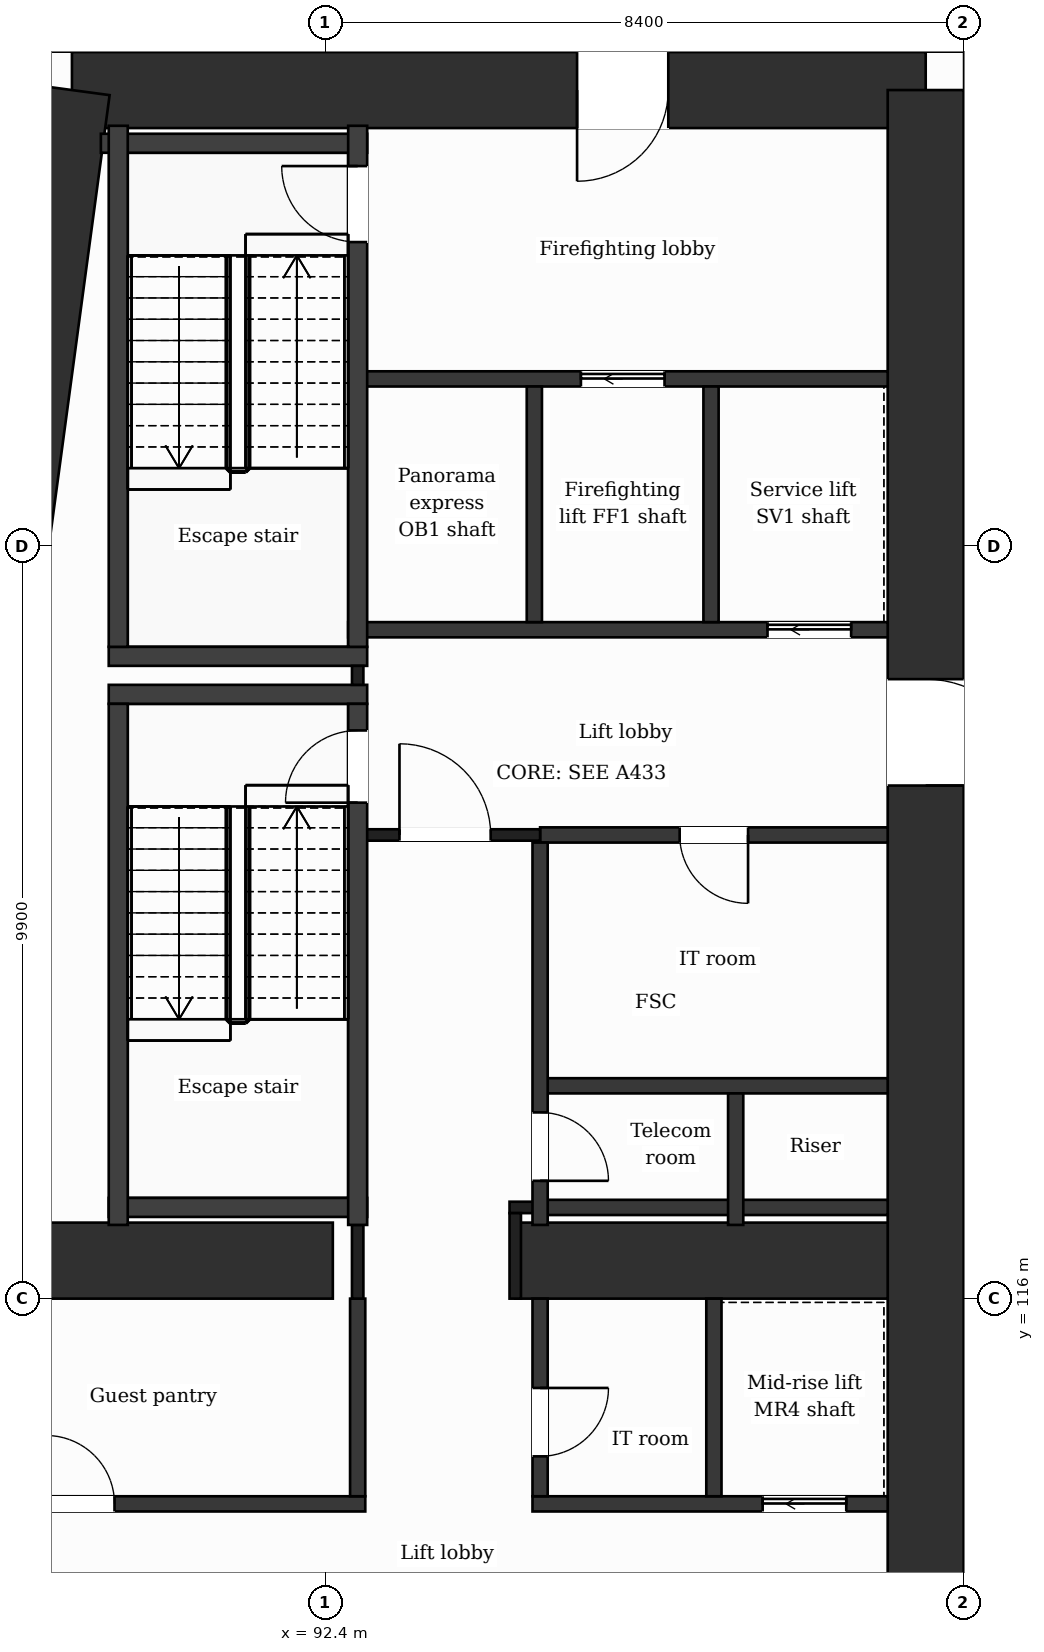
"""IFC4 building model, lengths in metres.
Left out: names, types, materials, properties, quantities, classifications, styles, units other than length and angle.
Written with IfcOpenShell. Run it as: python <this file> out.ifc"""

import sys

from ifc_helpers import new_model, si_unit, direction, frame, frame_2d, origin, place, context, subcontext, project, spatial, rectangle, extrude, element, fill, save


model = new_model("IFC4")
c1 = context("Model", 3, precision=1e-05, world=origin(), true_north=direction((0.0, 1.0)))
c2 = subcontext(c1, "Body", "Model", "MODEL_VIEW")
j1 = project(units=[si_unit("LENGTHUNIT", "METRE"), si_unit("PLANEANGLEUNIT", "RADIAN")], contexts=[c1])
p1 = place(None, origin())
s1 = spatial("IfcSite", under=j1, at=p1, CompositionType="ELEMENT")
p2 = place(p1, origin())
s2 = spatial("IfcBuilding", under=s1, at=p2, CompositionType="ELEMENT")
p3 = place(p2, frame((0.0, 0.0, 135.4)))
s3 = spatial("IfcBuildingStorey", under=s2, at=p3, CompositionType="ELEMENT", Elevation=135.4)
p4 = place(p3, frame((89.068, 131.9, 0.0), z_axis=(0.0, 0.0, 1.0), x_axis=(1.0, 0.0, 0.0)))
e1 = element("IfcWall", 1, at=p4, inside=s3, PredefinedType="SHEAR", context=c2, shape_type="SweptSolid", body=[
    extrude(rectangle(XDim=11.232, YDim=1.0, at=frame_2d((5.616, 0.0))), origin(), (0.0, 0.0, 1.0), 7.4),
])
p5 = place(p4, frame((6.646, 0.0, 0.0)))
e2 = element("IfcOpeningElement", 2, at=p5, cuts=e1, PredefinedType="OPENING", context=c2, shape_type="SweptSolid", body=[
    extrude(rectangle(XDim=1.2, YDim=2.1, at=frame_2d((0.6, 1.05))), frame((0.0, 0.51, 0.0), z_axis=(0.0, -1.0, 0.0), x_axis=(1.0, 0.0, 0.0)), (0.0, 0.0, 1.0), 1.02),
])
p6 = place(p3, frame((100.3, 131.9, 0.0), z_axis=(0.0, 0.0, 1.0), x_axis=(0.0, -1.0, 0.0)))
e3 = element("IfcWall", 3, at=p6, inside=s3, PredefinedType="SHEAR", context=c2, shape_type="SweptSolid", body=[
    extrude(rectangle(XDim=21.0, YDim=1.0, at=frame_2d((10.5, 0.0))), origin(), (0.0, 0.0, 1.0), 7.4),
])
p7 = place(p6, frame((7.75, 0.0, 0.0)))
e4 = element("IfcOpeningElement", 4, at=p7, cuts=e3, PredefinedType="OPENING", context=c2, shape_type="SweptSolid", body=[
    extrude(rectangle(XDim=1.4, YDim=2.1, at=frame_2d((0.7, 1.05))), frame((0.0, 0.51, 0.0), z_axis=(0.0, -1.0, 0.0), x_axis=(1.0, 0.0, 0.0)), (0.0, 0.0, 1.0), 1.02),
])
p8 = place(p3, frame((86.241, 110.9, 0.0), z_axis=(0.0, 0.0, 1.0), x_axis=(0.133411141623, 0.991060778808, 0.0)))
e5 = element("IfcWall", 5, at=p8, inside=s3, PredefinedType="SHEAR", context=c2, shape_type="SweptSolid", body=[
    extrude(rectangle(XDim=21.189, YDim=1.0, at=frame_2d((10.595, 0.0))), origin(), (0.0, 0.0, 1.0), 7.4),
])
p9 = place(p3, frame((87.423, 116.5, 0.0), z_axis=(0.0, 0.0, 1.0), x_axis=(1.0, 0.0, 0.0)))
e6 = element("IfcWall", 6, at=p9, inside=s3, PredefinedType="SHEAR", context=c2, shape_type="SweptSolid", body=[
    extrude(rectangle(XDim=5.077, YDim=1.0, at=frame_2d((2.539, 0.0))), origin(), (0.0, 0.0, 1.0), 7.4),
])
p10 = place(p3, frame((94.9, 116.5, 0.0), z_axis=(0.0, 0.0, 1.0), x_axis=(1.0, 0.0, 0.0)))
e7 = element("IfcWall", 7, at=p10, inside=s3, PredefinedType="SHEAR", context=c2, shape_type="SweptSolid", body=[
    extrude(rectangle(XDim=4.9, YDim=1.0, at=frame_2d((2.45, 0.0))), origin(), (0.0, 0.0, 1.0), 7.4),
])
p11 = place(p3, frame((87.039, 113.3, 0.0), z_axis=(0.0, 0.0, 1.0), x_axis=(1.0, 0.0, 0.0)))
e8 = element("IfcWall", 8, at=p11, inside=s3, PredefinedType="PARTITIONING", context=c2, shape_type="SweptSolid", body=[
    extrude(rectangle(XDim=5.888, YDim=0.2, at=frame_2d((2.944, 0.0))), origin(), (0.0, 0.0, 1.0), 6.9),
])
p12 = place(p11, frame((1.689, 0.0, 0.0)))
e9 = element("IfcOpeningElement", 9, at=p12, cuts=e8, PredefinedType="OPENING", context=c2, shape_type="SweptSolid", body=[
    extrude(rectangle(XDim=0.9, YDim=2.1, at=frame_2d((0.45, 1.05))), frame((0.0, 0.11, 0.0), z_axis=(0.0, -1.0, 0.0), x_axis=(1.0, 0.0, 0.0)), (0.0, 0.0, 1.0), 0.22),
])
p13 = place(p3, frame((95.127, 113.3, 0.0), z_axis=(0.0, 0.0, 1.0), x_axis=(1.0, 0.0, 0.0)))
e10 = element("IfcWall", 10, at=p13, inside=s3, PredefinedType="PARTITIONING", context=c2, shape_type="SweptSolid", body=[
    extrude(rectangle(XDim=4.673, YDim=0.2, at=frame_2d((2.336, 0.0))), origin(), (0.0, 0.0, 1.0), 6.9),
])
p14 = place(p13, frame((3.028, 0.0, 0.0)))
e11 = element("IfcOpeningElement", 11, at=p14, cuts=e10, PredefinedType="OPENING", context=c2, shape_type="SweptSolid", body=[
    extrude(rectangle(XDim=1.1, YDim=2.1, at=frame_2d((0.55, 1.05))), frame((0.0, 0.11, 0.0), z_axis=(0.0, -1.0, 0.0), x_axis=(1.0, 0.0, 0.0)), (0.0, 0.0, 1.0), 0.22),
])
p15 = place(p3, frame((95.227, 117.2, 0.0), z_axis=(0.0, 0.0, 1.0), x_axis=(1.0, 0.0, 0.0)))
e12 = element("IfcWall", 12, at=p15, inside=s3, PredefinedType="PARTITIONING", context=c2, shape_type="SweptSolid", body=[
    extrude(rectangle(XDim=4.573, YDim=0.2, at=frame_2d((2.287, 0.0))), origin(), (0.0, 0.0, 1.0), 6.9),
])
p16 = place(p3, frame((94.825, 117.2, 0.0), z_axis=(0.0, 0.0, 1.0), x_axis=(1.0, 0.0, 0.0)))
e13 = element("IfcWall", 13, at=p16, inside=s3, PredefinedType="PARTITIONING", context=c2, shape_type="SweptSolid", body=[
    extrude(rectangle(XDim=0.402, YDim=0.15, at=frame_2d((0.201, 0.0))), origin(), (0.0, 0.0, 1.0), 6.9),
])
p17 = place(p3, frame((89.552, 117.2, 0.0), z_axis=(0.0, 0.0, 1.0), x_axis=(1.0, 0.0, 0.0)))
e14 = element("IfcWall", 14, at=p17, inside=s3, PredefinedType="PARTITIONING", context=c2, shape_type="SweptSolid", body=[
    extrude(rectangle(XDim=3.4, YDim=0.25, at=frame_2d((1.7, 0.0))), origin(), (0.0, 0.0, 1.0), 6.9),
])
p18 = place(p3, frame((95.227, 118.8, 0.0), z_axis=(0.0, 0.0, 1.0), x_axis=(1.0, 0.0, 0.0)))
e15 = element("IfcWall", 15, at=p18, inside=s3, PredefinedType="PARTITIONING", context=c2, shape_type="SweptSolid", body=[
    extrude(rectangle(XDim=4.573, YDim=0.2, at=frame_2d((2.287, 0.0))), origin(), (0.0, 0.0, 1.0), 6.9),
])
p19 = place(p3, frame((95.227, 122.1, 0.0), z_axis=(0.0, 0.0, 1.0), x_axis=(1.0, 0.0, 0.0)))
e16 = element("IfcWall", 16, at=p19, inside=s3, PredefinedType="PARTITIONING", context=c2, shape_type="SweptSolid", body=[
    extrude(rectangle(XDim=4.573, YDim=0.2, at=frame_2d((2.287, 0.0))), origin(), (0.0, 0.0, 1.0), 6.9),
])
p20 = place(p19, frame((1.836, 0.0, 0.0)))
e17 = element("IfcOpeningElement", 17, at=p20, cuts=e16, PredefinedType="OPENING", context=c2, shape_type="SweptSolid", body=[
    extrude(rectangle(XDim=0.9, YDim=2.1, at=frame_2d((0.45, 1.05))), frame((0.0, 0.11, 0.0), z_axis=(0.0, -1.0, 0.0), x_axis=(1.0, 0.0, 0.0)), (0.0, 0.0, 1.0), 0.22),
])
p21 = place(p3, frame((92.827, 122.1, 0.0), z_axis=(0.0, 0.0, 1.0), x_axis=(1.0, 0.0, 0.0)))
e18 = element("IfcWall", 18, at=p21, inside=s3, PredefinedType="PARTITIONING", context=c2, shape_type="SweptSolid", body=[
    extrude(rectangle(XDim=2.4, YDim=0.15, at=frame_2d((1.2, 0.0))), origin(), (0.0, 0.0, 1.0), 6.9),
])
p22 = place(p21, frame((0.55, 0.0, 0.0)))
e19 = element("IfcOpeningElement", 19, at=p22, cuts=e18, PredefinedType="OPENING", context=c2, shape_type="SweptSolid", body=[
    extrude(rectangle(XDim=1.2, YDim=2.1, at=frame_2d((0.6, 1.05))), frame((0.0, 0.085, 0.0), z_axis=(0.0, -1.0, 0.0), x_axis=(1.0, 0.0, 0.0)), (0.0, 0.0, 1.0), 0.17),
])
for number, where, z_axis, x_axis in (
    (20, (89.552, 123.95, 0.0), (0.0, 0.0, 1.0), (1.0, 0.0, 0.0)),
    (21, (89.552, 124.45, 0.0), (0.0, 0.0, 1.0), (1.0, 0.0, 0.0)),
):
    element("IfcWall", number, at=place(p3, frame(where, z_axis=z_axis, x_axis=x_axis)), inside=s3, PredefinedType="PARTITIONING", context=c2, shape_type="SweptSolid", body=[
        extrude(rectangle(XDim=3.4, YDim=0.25, at=frame_2d((1.7, 0.0))), origin(), (0.0, 0.0, 1.0), 6.9),
    ])
p23 = place(p3, frame((92.702, 124.8, 0.0), z_axis=(0.0, 0.0, 1.0), x_axis=(1.0, 0.0, 0.0)))
e22 = element("IfcWall", 22, at=p23, inside=s3, PredefinedType="PARTITIONING", context=c2, shape_type="SweptSolid", body=[
    extrude(rectangle(XDim=7.098, YDim=0.2, at=frame_2d((3.549, 0.0))), origin(), (0.0, 0.0, 1.0), 6.9),
])
p24 = place(p23, frame((5.517, 0.0, 0.0)))
e23 = element("IfcOpeningElement", 23, at=p24, cuts=e22, PredefinedType="OPENING", context=c2, shape_type="SweptSolid", body=[
    extrude(rectangle(XDim=1.1, YDim=2.1, at=frame_2d((0.55, 1.05))), frame((0.0, 0.11, 0.0), z_axis=(0.0, -1.0, 0.0), x_axis=(1.0, 0.0, 0.0)), (0.0, 0.0, 1.0), 0.22),
])
p25 = place(p3, frame((92.827, 128.1, 0.0), z_axis=(0.0, 0.0, 1.0), x_axis=(1.0, 0.0, 0.0)))
e24 = element("IfcWall", 24, at=p25, inside=s3, PredefinedType="PARTITIONING", context=c2, shape_type="SweptSolid", body=[
    extrude(rectangle(XDim=6.973, YDim=0.2, at=frame_2d((3.487, 0.0))), origin(), (0.0, 0.0, 1.0), 6.9),
])
p26 = place(p25, frame((2.937, 0.0, 0.0)))
e25 = element("IfcOpeningElement", 25, at=p26, cuts=e24, PredefinedType="OPENING", context=c2, shape_type="SweptSolid", body=[
    extrude(rectangle(XDim=1.1, YDim=2.1, at=frame_2d((0.55, 1.05))), frame((0.0, 0.11, 0.0), z_axis=(0.0, -1.0, 0.0), x_axis=(1.0, 0.0, 0.0)), (0.0, 0.0, 1.0), 0.22),
])
p27 = place(p3, frame((89.448, 131.2, 0.0), z_axis=(0.0, 0.0, 1.0), x_axis=(1.0, 0.0, 0.0)))
e26 = element("IfcWall", 26, at=p27, inside=s3, PredefinedType="PARTITIONING", context=c2, shape_type="SweptSolid", body=[
    extrude(rectangle(XDim=3.504, YDim=0.25, at=frame_2d((1.752, 0.0))), origin(), (0.0, 0.0, 1.0), 6.9),
])
for number, where, z_axis, x_axis in (
    (27, (89.677, 116.97, 0.0), (0.0, 0.0, 1.0), (0.0, 1.0, 0.0)),
    (28, (89.677, 124.575, 0.0), (0.0, 0.0, 1.0), (0.0, 1.0, 0.0)),
):
    element("IfcWall", number, at=place(p3, frame(where, z_axis=z_axis, x_axis=x_axis)), inside=s3, PredefinedType="PARTITIONING", context=c2, shape_type="SweptSolid", body=[
        extrude(rectangle(XDim=6.855, YDim=0.25, at=frame_2d((3.427, 0.0))), origin(), (0.0, 0.0, 1.0), 6.9),
    ])
p28 = place(p3, frame((92.827, 113.4, 0.0), z_axis=(0.0, 0.0, 1.0), x_axis=(0.0, 1.0, 0.0)))
e29 = element("IfcWall", 29, at=p28, inside=s3, PredefinedType="PARTITIONING", context=c2, shape_type="SweptSolid", body=[
    extrude(rectangle(XDim=2.6, YDim=0.2, at=frame_2d((1.3, 0.0))), origin(), (0.0, 0.0, 1.0), 6.9),
])
p29 = place(p3, frame((92.827, 116.0, 0.0), z_axis=(0.0, 0.0, 1.0), x_axis=(0.0, 1.0, 0.0)))
e30 = element("IfcWall", 30, at=p29, inside=s3, PredefinedType="PARTITIONING", context=c2, shape_type="SweptSolid", body=[
    extrude(rectangle(XDim=0.97, YDim=0.15, at=frame_2d((0.485, 0.0))), origin(), (0.0, 0.0, 1.0), 6.9),
])
p30 = place(p3, frame((92.827, 124.075, 0.0), z_axis=(0.0, 0.0, 1.0), x_axis=(0.0, 1.0, 0.0)))
e31 = element("IfcWall", 31, at=p30, inside=s3, PredefinedType="PARTITIONING", context=c2, shape_type="SweptSolid", body=[
    extrude(rectangle(XDim=0.25, YDim=0.15, at=frame_2d((0.125, 0.0))), origin(), (0.0, 0.0, 1.0), 6.9),
])
p31 = place(p3, frame((92.827, 116.97, 0.0), z_axis=(0.0, 0.0, 1.0), x_axis=(0.0, 1.0, 0.0)))
e32 = element("IfcWall", 32, at=p31, inside=s3, PredefinedType="PARTITIONING", context=c2, shape_type="SweptSolid", body=[
    extrude(rectangle(XDim=6.855, YDim=0.25, at=frame_2d((3.427, 0.0))), origin(), (0.0, 0.0, 1.0), 6.9),
])
p32 = place(p31, frame((5.555, 0.0, 0.0)))
e33 = element("IfcOpeningElement", 33, at=p32, cuts=e32, PredefinedType="OPENING", context=c2, shape_type="SweptSolid", body=[
    extrude(rectangle(XDim=0.95, YDim=2.1, at=frame_2d((0.475, 1.05))), frame((0.0, 0.135, 0.0), z_axis=(0.0, -1.0, 0.0), x_axis=(1.0, 0.0, 0.0)), (0.0, 0.0, 1.0), 0.27),
])
p33 = place(p3, frame((92.827, 124.575, 0.0), z_axis=(0.0, 0.0, 1.0), x_axis=(0.0, 1.0, 0.0)))
e34 = element("IfcWall", 34, at=p33, inside=s3, PredefinedType="PARTITIONING", context=c2, shape_type="SweptSolid", body=[
    extrude(rectangle(XDim=6.855, YDim=0.25, at=frame_2d((3.427, 0.0))), origin(), (0.0, 0.0, 1.0), 6.9),
])
p34 = place(p33, frame((5.325, 0.0, 0.0)))
e35 = element("IfcOpeningElement", 35, at=p34, cuts=e34, PredefinedType="OPENING", context=c2, shape_type="SweptSolid", body=[
    extrude(rectangle(XDim=1.0, YDim=2.1, at=frame_2d((0.5, 1.05))), frame((0.0, 0.135, 0.0), z_axis=(0.0, -1.0, 0.0), x_axis=(1.0, 0.0, 0.0)), (0.0, 0.0, 1.0), 0.27),
])
p35 = place(p3, frame((94.9, 116.0, 0.0), z_axis=(0.0, 0.0, 1.0), x_axis=(0.0, 1.0, 0.0)))
e36 = element("IfcWall", 36, at=p35, inside=s3, PredefinedType="PARTITIONING", context=c2, shape_type="SweptSolid", body=[
    extrude(rectangle(XDim=1.125, YDim=0.15, at=frame_2d((0.562, 0.0))), origin(), (0.0, 0.0, 1.0), 6.9),
])
p36 = place(p3, frame((95.151, 124.9, 0.0), z_axis=(0.0, 0.0, 1.0), x_axis=(0.0, 1.0, 0.0)))
e37 = element("IfcWall", 37, at=p36, inside=s3, PredefinedType="PARTITIONING", context=c2, shape_type="SweptSolid", body=[
    extrude(rectangle(XDim=3.1, YDim=0.2, at=frame_2d((1.55, 0.0))), origin(), (0.0, 0.0, 1.0), 6.9),
])
p37 = place(p3, frame((95.227, 113.4, 0.0), z_axis=(0.0, 0.0, 1.0), x_axis=(0.0, 1.0, 0.0)))
e38 = element("IfcWall", 38, at=p37, inside=s3, PredefinedType="PARTITIONING", context=c2, shape_type="SweptSolid", body=[
    extrude(rectangle(XDim=2.6, YDim=0.2, at=frame_2d((1.3, 0.0))), origin(), (0.0, 0.0, 1.0), 6.9),
])
p38 = place(p37, frame((0.525, 0.0, 0.0)))
e39 = element("IfcOpeningElement", 39, at=p38, cuts=e38, PredefinedType="OPENING", context=c2, shape_type="SweptSolid", body=[
    extrude(rectangle(XDim=0.9, YDim=2.1, at=frame_2d((0.45, 1.05))), frame((0.0, 0.11, 0.0), z_axis=(0.0, -1.0, 0.0), x_axis=(1.0, 0.0, 0.0)), (0.0, 0.0, 1.0), 0.22),
])
p39 = place(p3, frame((95.227, 116.97, 0.0), z_axis=(0.0, 0.0, 1.0), x_axis=(0.0, 1.0, 0.0)))
e40 = element("IfcWall", 40, at=p39, inside=s3, PredefinedType="PARTITIONING", context=c2, shape_type="SweptSolid", body=[
    extrude(rectangle(XDim=5.03, YDim=0.2, at=frame_2d((2.515, 0.0))), origin(), (0.0, 0.0, 1.0), 6.9),
])
p40 = place(p39, frame((0.58, 0.0, 0.0)))
e41 = element("IfcOpeningElement", 41, at=p40, cuts=e40, PredefinedType="OPENING", context=c2, shape_type="SweptSolid", body=[
    extrude(rectangle(XDim=0.9, YDim=2.1, at=frame_2d((0.45, 1.05))), frame((0.0, 0.11, 0.0), z_axis=(0.0, -1.0, 0.0), x_axis=(1.0, 0.0, 0.0)), (0.0, 0.0, 1.0), 0.22),
])
p41 = place(p3, frame((97.476, 124.9, 0.0), z_axis=(0.0, 0.0, 1.0), x_axis=(0.0, 1.0, 0.0)))
e42 = element("IfcWall", 42, at=p41, inside=s3, PredefinedType="PARTITIONING", context=c2, shape_type="SweptSolid", body=[
    extrude(rectangle(XDim=3.1, YDim=0.2, at=frame_2d((1.55, 0.0))), origin(), (0.0, 0.0, 1.0), 6.9),
])
p42 = place(p3, frame((97.513, 113.4, 0.0), z_axis=(0.0, 0.0, 1.0), x_axis=(0.0, 1.0, 0.0)))
e43 = element("IfcWall", 43, at=p42, inside=s3, PredefinedType="PARTITIONING", context=c2, shape_type="SweptSolid", body=[
    extrude(rectangle(XDim=2.6, YDim=0.2, at=frame_2d((1.3, 0.0))), origin(), (0.0, 0.0, 1.0), 6.9),
])
p43 = place(p3, frame((97.8, 116.97, 0.0), z_axis=(0.0, 0.0, 1.0), x_axis=(0.0, 1.0, 0.0)))
e44 = element("IfcWall", 44, at=p43, inside=s3, PredefinedType="PARTITIONING", context=c2, shape_type="SweptSolid", body=[
    extrude(rectangle(XDim=1.73, YDim=0.2, at=frame_2d((0.865, 0.0))), origin(), (0.0, 0.0, 1.0), 6.9),
])
p44 = place(p22, origin())
e45 = element("IfcDoor", 45, at=p44, inside=s3, OperationType="SINGLE_SWING_LEFT", PredefinedType="DOOR", context=c2, shape_type="SweptSolid", body=[
    extrude(rectangle(XDim=1.2, YDim=2.1, at=frame_2d((0.6, 1.05))), frame((0.0, 0.025, 0.0), z_axis=(0.0, -1.0, 0.0), x_axis=(1.0, 0.0, 0.0)), (0.0, 0.0, 1.0), 0.05),
])
fill(e19, e45)
p45 = place(p26, origin())
e46 = element("IfcDoor", 46, at=p45, inside=s3, OperationType="SLIDING_TO_LEFT", PredefinedType="DOOR", context=c2, shape_type="SweptSolid", body=[
    extrude(rectangle(XDim=1.1, YDim=2.1, at=frame_2d((0.55, 1.05))), frame((0.0, 0.025, 0.0), z_axis=(0.0, -1.0, 0.0), x_axis=(1.0, 0.0, 0.0)), (0.0, 0.0, 1.0), 0.05),
])
fill(e25, e46)
p46 = place(p24, origin())
e47 = element("IfcDoor", 47, at=p46, inside=s3, OperationType="SLIDING_TO_LEFT", PredefinedType="DOOR", context=c2, shape_type="SweptSolid", body=[
    extrude(rectangle(XDim=1.1, YDim=2.1, at=frame_2d((0.55, 1.05))), frame((0.0, 0.025, 0.0), z_axis=(0.0, -1.0, 0.0), x_axis=(1.0, 0.0, 0.0)), (0.0, 0.0, 1.0), 0.05),
])
fill(e23, e47)
p47 = place(p20, origin())
e48 = element("IfcDoor", 48, at=p47, inside=s3, OperationType="SINGLE_SWING_RIGHT", PredefinedType="DOOR", context=c2, shape_type="SweptSolid", body=[
    extrude(rectangle(XDim=0.9, YDim=2.1, at=frame_2d((0.45, 1.05))), frame((0.0, 0.025, 0.0), z_axis=(0.0, -1.0, 0.0), x_axis=(1.0, 0.0, 0.0)), (0.0, 0.0, 1.0), 0.05),
])
fill(e17, e48)
p48 = place(p32, origin())
e49 = element("IfcDoor", 49, at=p48, inside=s3, OperationType="SINGLE_SWING_LEFT", PredefinedType="DOOR", context=c2, shape_type="SweptSolid", body=[
    extrude(rectangle(XDim=0.95, YDim=2.1, at=frame_2d((0.475, 1.05))), frame((0.0, 0.025, 0.0), z_axis=(0.0, -1.0, 0.0), x_axis=(1.0, 0.0, 0.0)), (0.0, 0.0, 1.0), 0.05),
])
fill(e33, e49)
p49 = place(p34, origin())
e50 = element("IfcDoor", 50, at=p49, inside=s3, OperationType="SINGLE_SWING_RIGHT", PredefinedType="DOOR", context=c2, shape_type="SweptSolid", body=[
    extrude(rectangle(XDim=1.0, YDim=2.1, at=frame_2d((0.5, 1.05))), frame((0.0, 0.025, 0.0), z_axis=(0.0, -1.0, 0.0), x_axis=(1.0, 0.0, 0.0)), (0.0, 0.0, 1.0), 0.05),
])
fill(e35, e50)
p50 = place(p40, origin())
e51 = element("IfcDoor", 51, at=p50, inside=s3, OperationType="SINGLE_SWING_LEFT", PredefinedType="DOOR", context=c2, shape_type="SweptSolid", body=[
    extrude(rectangle(XDim=0.9, YDim=2.1, at=frame_2d((0.45, 1.05))), frame((0.0, 0.025, 0.0), z_axis=(0.0, -1.0, 0.0), x_axis=(1.0, 0.0, 0.0)), (0.0, 0.0, 1.0), 0.05),
])
fill(e41, e51)
p51 = place(p14, origin())
e52 = element("IfcDoor", 52, at=p51, inside=s3, OperationType="SLIDING_TO_LEFT", PredefinedType="DOOR", context=c2, shape_type="SweptSolid", body=[
    extrude(rectangle(XDim=1.1, YDim=2.1, at=frame_2d((0.55, 1.05))), frame((0.0, 0.025, 0.0), z_axis=(0.0, -1.0, 0.0), x_axis=(1.0, 0.0, 0.0)), (0.0, 0.0, 1.0), 0.05),
])
fill(e11, e52)
p52 = place(p12, origin())
e53 = element("IfcDoor", 53, at=p52, inside=s3, OperationType="SINGLE_SWING_LEFT", PredefinedType="DOOR", context=c2, shape_type="SweptSolid", body=[
    extrude(rectangle(XDim=0.9, YDim=2.1, at=frame_2d((0.45, 1.05))), frame((0.0, 0.025, 0.0), z_axis=(0.0, -1.0, 0.0), x_axis=(1.0, 0.0, 0.0)), (0.0, 0.0, 1.0), 0.05),
])
fill(e9, e53)
p53 = place(p38, origin())
e54 = element("IfcDoor", 54, at=p53, inside=s3, OperationType="SINGLE_SWING_RIGHT", PredefinedType="DOOR", context=c2, shape_type="SweptSolid", body=[
    extrude(rectangle(XDim=0.9, YDim=2.1, at=frame_2d((0.45, 1.05))), frame((0.0, 0.025, 0.0), z_axis=(0.0, -1.0, 0.0), x_axis=(1.0, 0.0, 0.0)), (0.0, 0.0, 1.0), 0.05),
])
fill(e39, e54)
p54 = place(p5, origin())
e55 = element("IfcDoor", 55, at=p54, inside=s3, OperationType="SINGLE_SWING_LEFT", PredefinedType="DOOR", context=c2, shape_type="SweptSolid", body=[
    extrude(rectangle(XDim=1.2, YDim=2.1, at=frame_2d((0.6, 1.05))), frame((0.0, 0.025, 0.0), z_axis=(0.0, -1.0, 0.0), x_axis=(1.0, 0.0, 0.0)), (0.0, 0.0, 1.0), 0.05),
])
fill(e2, e55)
p55 = place(p7, origin())
e56 = element("IfcDoor", 56, at=p55, inside=s3, OperationType="SINGLE_SWING_RIGHT", PredefinedType="DOOR", context=c2, shape_type="SweptSolid", body=[
    extrude(rectangle(XDim=1.4, YDim=2.1, at=frame_2d((0.7, 1.05))), frame((0.0, 0.025, 0.0), z_axis=(0.0, -1.0, 0.0), x_axis=(1.0, 0.0, 0.0)), (0.0, 0.0, 1.0), 0.05),
])
fill(e4, e56)
save(model, sys.argv[1])
